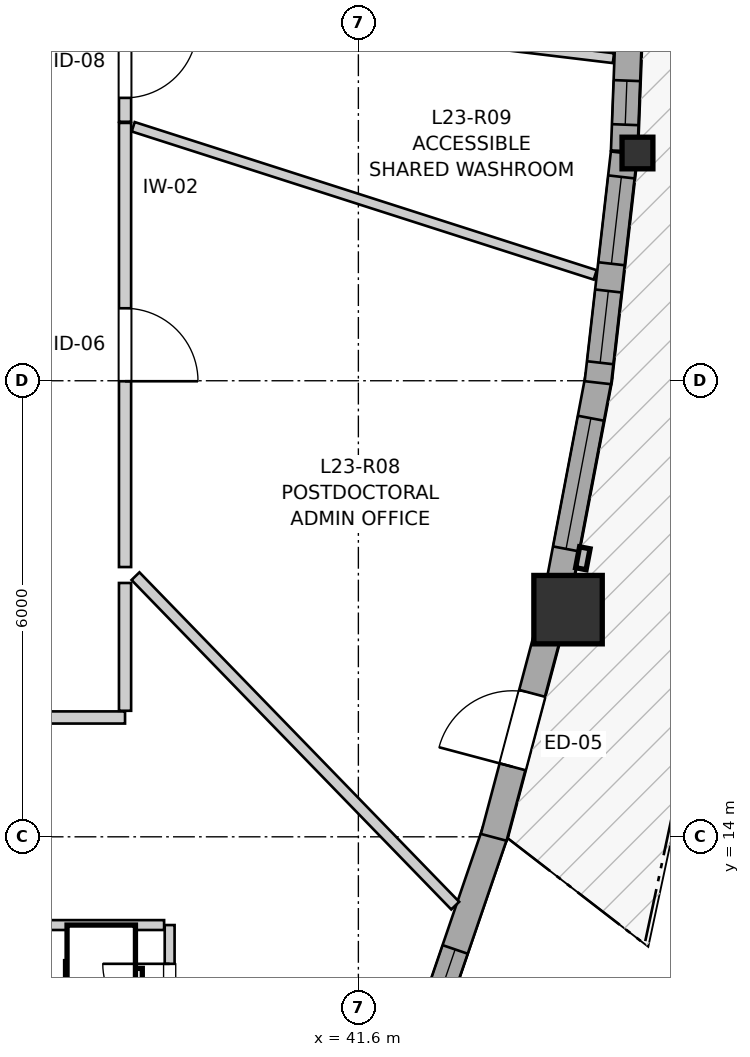
"""IFC4 building model, lengths in metres.
Left out: names, types, materials, properties, quantities, classifications, styles, units other than length and angle.
Written with IfcOpenShell. Run it as: python <this file> out.ifc"""

import sys

from ifc_helpers import new_model, si_unit, direction, frame, frame_2d, origin, origin_2d, place, context, subcontext, project, spatial, rectangle, i_section, extrude, source, transform, mapped, element, fill, save


model = new_model("IFC4")
c1 = context("Model", 3, precision=1e-05, world=origin(), true_north=direction((0.0, 1.0)))
c2 = subcontext(c1, "Body", "Model", "MODEL_VIEW")
j1 = project(units=[si_unit("LENGTHUNIT", "METRE"), si_unit("PLANEANGLEUNIT", "RADIAN")], contexts=[c1])
p1 = place(None, origin())
s1 = spatial("IfcSite", under=j1, at=p1, CompositionType="ELEMENT")
p2 = place(p1, origin())
s2 = spatial("IfcBuilding", under=s1, at=p2, CompositionType="ELEMENT")
p3 = place(p2, frame((0.0, 0.0, 80.0)))
s3 = spatial("IfcBuildingStorey", under=s2, at=p3, CompositionType="ELEMENT", Elevation=80.0)
m1 = source(origin(), c2, "Body", "SweptSolid", [
    extrude(rectangle(XDim=0.9, YDim=0.9, at=origin_2d()), origin(), (0.0, 0.0, 1.0), 2.935),
])
p4 = place(p3, frame((44.359, 16.989, 0.0), z_axis=(0.0, 0.0, 1.0), x_axis=(1.0, 0.0, 0.0)))
e1 = element("IfcColumn", 1, at=p4, inside=s3, PredefinedType="COLUMN", context=c2, shape_type="MappedRepresentation", body=[
    mapped(m1, transform((0.0, 0.0, 0.0), x_axis=(1.0, 0.0, 0.0), y_axis=(0.0, 1.0, 0.0), z_axis=(0.0, 0.0, 1.0), scale=1.0)),
])
m2 = source(origin(), c2, "Body", "SweptSolid", [
    extrude(i_section(OverallWidth=0.406, OverallDepth=0.416, WebThickness=0.027, FlangeThickness=0.044, FilletRadius=0.015, at=origin_2d()), origin(), (0.0, 0.0, 1.0), 2.935),
])
p5 = place(p3, frame((45.272, 22.996, 0.0), z_axis=(0.0, 0.0, 1.0), x_axis=(1.0, 0.0, 0.0)))
e2 = element("IfcColumn", 2, at=p5, inside=s3, PredefinedType="PILASTER", context=c2, shape_type="MappedRepresentation", body=[
    mapped(m2, transform((0.0, 0.0, 0.0), x_axis=(1.0, 0.0, 0.0), y_axis=(0.0, 1.0, 0.0), z_axis=(0.0, 0.0, 1.0), scale=1.0)),
])
p6 = place(p3, frame((42.373, 11.057, 0.0), z_axis=(0.0, 0.0, 1.0), x_axis=(0.323628226775, 0.946184321808, 0.0)))
e3 = element("IfcWall", 3, at=p6, inside=s3, PredefinedType="SOLIDWALL", context=c2, shape_type="SweptSolid", body=[
    extrude(rectangle(XDim=3.193, YDim=0.35, at=frame_2d((1.596, 0.0))), origin(), (0.0, 0.0, 1.0), 2.465),
])
p7 = place(p6, frame((0.595, 0.0, 0.82)))
e4 = element("IfcOpeningElement", 4, at=p7, cuts=e3, PredefinedType="OPENING", context=c2, shape_type="SweptSolid", body=[
    extrude(rectangle(XDim=0.95, YDim=1.35, at=frame_2d((0.475, 0.675))), frame((0.0, 0.185, 0.0), z_axis=(0.0, -1.0, 0.0), x_axis=(1.0, 0.0, 0.0)), (0.0, 0.0, 1.0), 0.37),
])
p8 = place(p3, frame((43.381, 13.993, 0.0), z_axis=(0.0, 0.0, 1.0), x_axis=(0.257079998736, 0.966390125286, 0.0)))
e5 = element("IfcWall", 5, at=p8, inside=s3, PredefinedType="SOLIDWALL", context=c2, shape_type="SweptSolid", body=[
    extrude(rectangle(XDim=2.921, YDim=0.35, at=frame_2d((1.46, 0.0))), origin(), (0.0, 0.0, 1.0), 2.465),
])
p9 = place(p8, frame((0.961, 0.0, 0.0)))
e6 = element("IfcOpeningElement", 6, at=p9, cuts=e5, PredefinedType="OPENING", context=c2, shape_type="SweptSolid", body=[
    extrude(rectangle(XDim=1.0, YDim=2.1, at=frame_2d((0.5, 1.05))), frame((0.0, 0.185, 0.0), z_axis=(0.0, -1.0, 0.0), x_axis=(1.0, 0.0, 0.0)), (0.0, 0.0, 1.0), 0.37),
])
p10 = place(p3, frame((44.229, 17.242, 0.0), z_axis=(0.0, 0.0, 1.0), x_axis=(0.186588413417, 0.982438173107, 0.0)))
e7 = element("IfcWall", 7, at=p10, inside=s3, PredefinedType="SOLIDWALL", context=c2, shape_type="SweptSolid", body=[
    extrude(rectangle(XDim=2.871, YDim=0.35, at=frame_2d((1.436, 0.0))), origin(), (0.0, 0.0, 1.0), 2.465),
])
p11 = place(p10, frame((0.555, 0.0, 0.82)))
e8 = element("IfcOpeningElement", 8, at=p11, cuts=e7, PredefinedType="OPENING", context=c2, shape_type="SweptSolid", body=[
    extrude(rectangle(XDim=1.75, YDim=1.3, at=frame_2d((0.875, 0.65))), frame((0.0, 0.185, 0.0), z_axis=(0.0, -1.0, 0.0), x_axis=(1.0, 0.0, 0.0)), (0.0, 0.0, 1.0), 0.37),
])
p12 = place(p3, frame((44.751, 19.975, 0.0), z_axis=(0.0, 0.0, 1.0), x_axis=(0.113356399423, 0.993554390413, 0.0)))
e9 = element("IfcWall", 9, at=p12, inside=s3, PredefinedType="SOLIDWALL", context=c2, shape_type="SweptSolid", body=[
    extrude(rectangle(XDim=3.041, YDim=0.35, at=frame_2d((1.521, 0.0))), origin(), (0.0, 0.0, 1.0), 2.465),
])
p13 = place(p12, frame((0.264, 0.0, 0.82)))
e10 = element("IfcOpeningElement", 10, at=p13, cuts=e9, PredefinedType="OPENING", context=c2, shape_type="SweptSolid", body=[
    extrude(rectangle(XDim=0.95, YDim=1.35, at=frame_2d((0.475, 0.675))), frame((0.0, 0.185, 0.0), z_axis=(0.0, -1.0, 0.0), x_axis=(1.0, 0.0, 0.0)), (0.0, 0.0, 1.0), 0.37),
])
p14 = place(p12, frame((1.575, 0.0, 0.82)))
e11 = element("IfcOpeningElement", 11, at=p14, cuts=e9, PredefinedType="OPENING", context=c2, shape_type="SweptSolid", body=[
    extrude(rectangle(XDim=1.15, YDim=1.2, at=frame_2d((0.575, 0.6))), frame((0.0, 0.185, 0.0), z_axis=(0.0, -1.0, 0.0), x_axis=(1.0, 0.0, 0.0)), (0.0, 0.0, 1.0), 0.37),
])
p15 = place(p3, frame((45.098, 23.023, 0.0), z_axis=(0.0, 0.0, 1.0), x_axis=(0.037943250197, 0.999279895607, 0.0)))
e12 = element("IfcWall", 12, at=p15, inside=s3, PredefinedType="SOLIDWALL", context=c2, shape_type="SweptSolid", body=[
    extrude(rectangle(XDim=3.024, YDim=0.35, at=frame_2d((1.512, 0.0))), origin(), (0.0, 0.0, 1.0), 2.465),
])
p16 = place(p15, frame((0.346, 0.0, 0.82)))
e13 = element("IfcOpeningElement", 13, at=p16, cuts=e12, PredefinedType="OPENING", context=c2, shape_type="SweptSolid", body=[
    extrude(rectangle(XDim=0.58, YDim=1.35, at=frame_2d((0.29, 0.675))), frame((0.0, 0.185, 0.0), z_axis=(0.0, -1.0, 0.0), x_axis=(1.0, 0.0, 0.0)), (0.0, 0.0, 1.0), 0.37),
])
p17 = place(p15, frame((1.404, 0.0, 0.82)))
e14 = element("IfcOpeningElement", 14, at=p17, cuts=e12, PredefinedType="OPENING", context=c2, shape_type="SweptSolid", body=[
    extrude(rectangle(XDim=1.35, YDim=1.45, at=frame_2d((0.675, 0.725))), frame((0.0, 0.185, 0.0), z_axis=(0.0, -1.0, 0.0), x_axis=(1.0, 0.0, 0.0)), (0.0, 0.0, 1.0), 0.37),
])
p18 = place(p3, frame((38.53, 23.392, 0.0), z_axis=(0.0, 0.0, 1.0), x_axis=(0.0, -1.0, 0.0)))
e15 = element("IfcWall", 15, at=p18, inside=s3, PredefinedType="PARTITIONING", context=c2, shape_type="SweptSolid", body=[
    extrude(rectangle(XDim=5.843, YDim=0.16, at=frame_2d((2.921, 0.0))), origin(), (0.0, 0.0, 1.0), 2.935),
])
p19 = place(p18, frame((2.438, 0.0, 0.0)))
e16 = element("IfcOpeningElement", 16, at=p19, cuts=e15, PredefinedType="OPENING", context=c2, shape_type="SweptSolid", body=[
    extrude(rectangle(XDim=0.96, YDim=2.1, at=frame_2d((0.48, 1.05))), frame((0.0, 0.09, 0.0), z_axis=(0.0, -1.0, 0.0), x_axis=(1.0, 0.0, 0.0)), (0.0, 0.0, 1.0), 0.18),
])
p20 = place(p3, frame((38.53, 15.57, 0.0), z_axis=(0.0, 0.0, 1.0), x_axis=(-1.0, 0.0, 0.0)))
e17 = element("IfcWall", 17, at=p20, inside=s3, PredefinedType="PARTITIONING", context=c2, shape_type="SweptSolid", body=[
    extrude(rectangle(XDim=3.257, YDim=0.16, at=frame_2d((1.628, 0.0))), origin(), (0.0, 0.0, 1.0), 2.935),
])
p21 = place(p20, frame((1.16, 0.0, 0.0)))
e18 = element("IfcOpeningElement", 18, at=p21, cuts=e17, PredefinedType="OPENING", context=c2, shape_type="SweptSolid", body=[
    extrude(rectangle(XDim=0.92, YDim=2.1, at=frame_2d((0.46, 1.05))), frame((0.0, 0.09, 0.0), z_axis=(0.0, -1.0, 0.0), x_axis=(1.0, 0.0, 0.0)), (0.0, 0.0, 1.0), 0.18),
])
p22 = place(p3, frame((39.117, 10.939, 0.0), z_axis=(0.0, 0.0, 1.0), x_axis=(0.0, 1.0, 0.0)))
e19 = element("IfcWall", 19, at=p22, inside=s3, PredefinedType="PARTITIONING", context=c2, shape_type="SweptSolid", body=[
    extrude(rectangle(XDim=1.9, YDim=0.13, at=frame_2d((0.95, 0.0))), origin(), (0.0, 0.0, 1.0), 2.935),
])
p23 = place(p22, frame((0.51, 0.0, 0.0)))
e20 = element("IfcOpeningElement", 20, at=p23, cuts=e19, PredefinedType="OPENING", context=c2, shape_type="SweptSolid", body=[
    extrude(rectangle(XDim=0.88, YDim=2.05, at=frame_2d((0.44, 1.025))), frame((0.0, 0.075, 0.0), z_axis=(0.0, -1.0, 0.0), x_axis=(1.0, 0.0, 0.0)), (0.0, 0.0, 1.0), 0.15),
])
p24 = place(p3, frame((38.53, 25.032, 0.0), z_axis=(0.0, 0.0, 1.0), x_axis=(0.0, -1.0, 0.0)))
e21 = element("IfcWall", 21, at=p24, inside=s3, PredefinedType="PARTITIONING", context=c2, shape_type="SweptSolid", body=[
    extrude(rectangle(XDim=1.625, YDim=0.16, at=frame_2d((0.812, 0.0))), origin(), (0.0, 0.0, 1.0), 2.935),
])
p25 = place(p24, frame((0.361, 0.0, 0.0)))
e22 = element("IfcOpeningElement", 22, at=p25, cuts=e21, PredefinedType="OPENING", context=c2, shape_type="SweptSolid", body=[
    extrude(rectangle(XDim=0.95, YDim=2.1, at=frame_2d((0.475, 1.05))), frame((0.0, 0.09, 0.0), z_axis=(0.0, -1.0, 0.0), x_axis=(1.0, 0.0, 0.0)), (0.0, 0.0, 1.0), 0.18),
])
p26 = place(p3, frame((38.637, 23.342, 0.0), z_axis=(0.0, 0.0, 1.0), x_axis=(0.952253923936, -0.305307163933, 0.0)))
e23 = element("IfcWall", 23, at=p26, inside=s3, PredefinedType="PARTITIONING", context=c2, shape_type="SweptSolid", body=[
    extrude(rectangle(XDim=6.384, YDim=0.13, at=frame_2d((3.192, 0.0))), origin(), (0.0, 0.0, 1.0), 2.935),
])
p27 = place(p3, frame((38.626, 25.006, 0.0), z_axis=(0.0, 0.0, 1.0), x_axis=(0.992837647249, -0.11947136144, 0.0)))
e24 = element("IfcWall", 24, at=p27, inside=s3, PredefinedType="PARTITIONING", context=c2, shape_type="SweptSolid", body=[
    extrude(rectangle(XDim=6.376, YDim=0.13, at=frame_2d((3.188, 0.0))), origin(), (0.0, 0.0, 1.0), 2.935),
])
p28 = place(p3, frame((38.667, 17.429, 0.0), z_axis=(0.0, 0.0, 1.0), x_axis=(0.696417222112, -0.717637131666, 0.0)))
e25 = element("IfcWall", 25, at=p28, inside=s3, PredefinedType="PARTITIONING", context=c2, shape_type="SweptSolid", body=[
    extrude(rectangle(XDim=6.04, YDim=0.145, at=frame_2d((3.02, 0.0))), origin(), (0.0, 0.0, 1.0), 2.935),
])
p29 = place(p3, frame((38.53, 15.658, 0.0), z_axis=(0.0, 0.0, 1.0), x_axis=(0.0, 1.0, 0.0)))
e26 = element("IfcWall", 26, at=p29, inside=s3, PredefinedType="PARTITIONING", context=c2, shape_type="SweptSolid", body=[
    extrude(rectangle(XDim=1.682, YDim=0.16, at=frame_2d((0.841, 0.0))), origin(), (0.0, 0.0, 1.0), 2.935),
])
p30 = place(p3, frame((37.317, 12.839, 0.0), z_axis=(0.0, 0.0, 1.0), x_axis=(1.0, 0.0, 0.0)))
e27 = element("IfcWall", 27, at=p30, inside=s3, PredefinedType="PARTITIONING", context=c2, shape_type="SweptSolid", body=[
    extrude(rectangle(XDim=1.727, YDim=0.13, at=frame_2d((0.864, 0.0))), origin(), (0.0, 0.0, 1.0), 2.935),
])
m3 = source(origin(), c2, "Body", "SweptSolid", [
    extrude(rectangle(XDim=0.95, YDim=1.35, at=frame_2d((0.475, 0.675))), frame((0.0, 0.03, 0.0), z_axis=(0.0, -1.0, 0.0), x_axis=(1.0, 0.0, 0.0)), (0.0, 0.0, 1.0), 0.06),
])
p31 = place(p7, origin())
e28 = element("IfcWindow", 28, at=p31, inside=s3, PartitioningType="SINGLE_PANEL", PredefinedType="WINDOW", context=c2, shape_type="MappedRepresentation", body=[
    mapped(m3, transform((0.0, 0.0, 0.0), x_axis=(1.0, 0.0, 0.0), y_axis=(0.0, 1.0, 0.0), z_axis=(0.0, 0.0, 1.0), scale=1.0)),
])
fill(e4, e28)
m4 = source(origin(), c2, "Body", "SweptSolid", [
    extrude(rectangle(XDim=1.75, YDim=1.3, at=frame_2d((0.875, 0.65))), frame((0.0, 0.03, 0.0), z_axis=(0.0, -1.0, 0.0), x_axis=(1.0, 0.0, 0.0)), (0.0, 0.0, 1.0), 0.06),
])
p32 = place(p11, origin())
e29 = element("IfcWindow", 29, at=p32, inside=s3, PartitioningType="SINGLE_PANEL", PredefinedType="WINDOW", context=c2, shape_type="MappedRepresentation", body=[
    mapped(m4, transform((0.0, 0.0, 0.0), x_axis=(1.0, 0.0, 0.0), y_axis=(0.0, 1.0, 0.0), z_axis=(0.0, 0.0, 1.0), scale=1.0)),
])
fill(e8, e29)
p33 = place(p13, origin())
e30 = element("IfcWindow", 30, at=p33, inside=s3, PartitioningType="SINGLE_PANEL", PredefinedType="WINDOW", context=c2, shape_type="MappedRepresentation", body=[
    mapped(m3, transform((0.0, 0.0, 0.0), x_axis=(1.0, 0.0, 0.0), y_axis=(0.0, 1.0, 0.0), z_axis=(0.0, 0.0, 1.0), scale=1.0)),
])
fill(e10, e30)
m5 = source(origin(), c2, "Body", "SweptSolid", [
    extrude(rectangle(XDim=1.15, YDim=1.2, at=frame_2d((0.575, 0.6))), frame((0.0, 0.03, 0.0), z_axis=(0.0, -1.0, 0.0), x_axis=(1.0, 0.0, 0.0)), (0.0, 0.0, 1.0), 0.06),
])
p34 = place(p14, origin())
e31 = element("IfcWindow", 31, at=p34, inside=s3, PartitioningType="SINGLE_PANEL", PredefinedType="WINDOW", context=c2, shape_type="MappedRepresentation", body=[
    mapped(m5, transform((0.0, 0.0, 0.0), x_axis=(1.0, 0.0, 0.0), y_axis=(0.0, 1.0, 0.0), z_axis=(0.0, 0.0, 1.0), scale=1.0)),
])
fill(e11, e31)
m6 = source(origin(), c2, "Body", "SweptSolid", [
    extrude(rectangle(XDim=0.58, YDim=1.35, at=frame_2d((0.29, 0.675))), frame((0.0, 0.03, 0.0), z_axis=(0.0, -1.0, 0.0), x_axis=(1.0, 0.0, 0.0)), (0.0, 0.0, 1.0), 0.06),
])
p35 = place(p16, origin())
e32 = element("IfcWindow", 32, at=p35, inside=s3, PartitioningType="SINGLE_PANEL", PredefinedType="WINDOW", context=c2, shape_type="MappedRepresentation", body=[
    mapped(m6, transform((0.0, 0.0, 0.0), x_axis=(1.0, 0.0, 0.0), y_axis=(0.0, 1.0, 0.0), z_axis=(0.0, 0.0, 1.0), scale=1.0)),
])
fill(e13, e32)
m7 = source(origin(), c2, "Body", "SweptSolid", [
    extrude(rectangle(XDim=1.0, YDim=2.1, at=frame_2d((0.5, 1.05))), frame((0.0, 0.025, 0.0), z_axis=(0.0, -1.0, 0.0), x_axis=(1.0, 0.0, 0.0)), (0.0, 0.0, 1.0), 0.05),
])
p36 = place(p9, origin())
e33 = element("IfcDoor", 33, at=p36, inside=s3, OperationType="SINGLE_SWING_LEFT", PredefinedType="DOOR", context=c2, shape_type="MappedRepresentation", body=[
    mapped(m7, transform((0.0, 0.0, 0.0), x_axis=(1.0, 0.0, 0.0), y_axis=(0.0, 1.0, 0.0), z_axis=(0.0, 0.0, 1.0), scale=1.0)),
])
fill(e6, e33)
m8 = source(origin(), c2, "Body", "SweptSolid", [
    extrude(rectangle(XDim=0.96, YDim=2.1, at=frame_2d((0.48, 1.05))), frame((0.0, 0.025, 0.0), z_axis=(0.0, -1.0, 0.0), x_axis=(1.0, 0.0, 0.0)), (0.0, 0.0, 1.0), 0.05),
])
p37 = place(p19, origin())
e34 = element("IfcDoor", 34, at=p37, inside=s3, OperationType="SINGLE_SWING_RIGHT", PredefinedType="DOOR", context=c2, shape_type="MappedRepresentation", body=[
    mapped(m8, transform((0.0, 0.0, 0.0), x_axis=(1.0, 0.0, 0.0), y_axis=(0.0, 1.0, 0.0), z_axis=(0.0, 0.0, 1.0), scale=1.0)),
])
fill(e16, e34)
m9 = source(origin(), c2, "Body", "SweptSolid", [
    extrude(rectangle(XDim=0.88, YDim=2.05, at=frame_2d((0.44, 1.025))), frame((0.0, 0.025, 0.0), z_axis=(0.0, -1.0, 0.0), x_axis=(1.0, 0.0, 0.0)), (0.0, 0.0, 1.0), 0.05),
])
p38 = place(p23, origin())
e35 = element("IfcDoor", 35, at=p38, inside=s3, OperationType="SINGLE_SWING_RIGHT", PredefinedType="DOOR", context=c2, shape_type="MappedRepresentation", body=[
    mapped(m9, transform((0.0, 0.0, 0.0), x_axis=(1.0, 0.0, 0.0), y_axis=(0.0, 1.0, 0.0), z_axis=(0.0, 0.0, 1.0), scale=1.0)),
])
fill(e20, e35)
m10 = source(origin(), c2, "Body", "SweptSolid", [
    extrude(rectangle(XDim=0.95, YDim=2.1, at=frame_2d((0.475, 1.05))), frame((0.0, 0.025, 0.0), z_axis=(0.0, -1.0, 0.0), x_axis=(1.0, 0.0, 0.0)), (0.0, 0.0, 1.0), 0.05),
])
p39 = place(p25, origin())
e36 = element("IfcDoor", 36, at=p39, inside=s3, OperationType="SINGLE_SWING_LEFT", PredefinedType="DOOR", context=c2, shape_type="MappedRepresentation", body=[
    mapped(m10, transform((0.0, 0.0, 0.0), x_axis=(1.0, 0.0, 0.0), y_axis=(0.0, 1.0, 0.0), z_axis=(0.0, 0.0, 1.0), scale=1.0)),
])
fill(e22, e36)
save(model, sys.argv[1])
